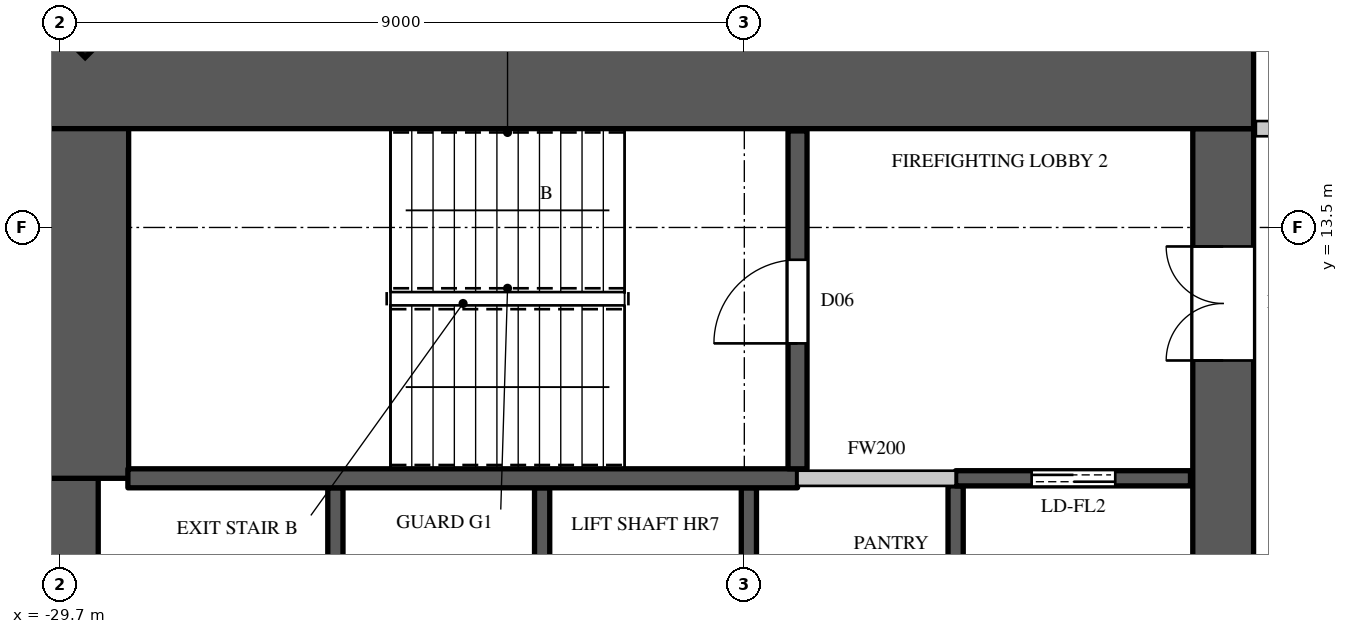
"""IFC4 building model, lengths in metres.
Left out: names, types, materials, properties, quantities, classifications, styles, units other than length and angle.
Written with IfcOpenShell. Run it as: python <this file> out.ifc"""

import sys

from ifc_helpers import new_model, si_unit, direction, frame, frame_2d, origin, origin_2d, place, context, subcontext, project, spatial, rectangle, extrude, element, fill, save


model = new_model("IFC4")
c1 = context("Model", 3, precision=1e-05, world=origin(), true_north=direction((0.0, 1.0)))
c2 = subcontext(c1, "Body", "Model", "MODEL_VIEW")
j1 = project(units=[si_unit("LENGTHUNIT", "METRE"), si_unit("PLANEANGLEUNIT", "RADIAN")], contexts=[c1])
p1 = place(None, origin())
s1 = spatial("IfcSite", under=j1, at=p1, CompositionType="ELEMENT")
p2 = place(p1, origin())
s2 = spatial("IfcBuilding", under=s1, at=p2, CompositionType="ELEMENT")
p3 = place(p2, frame((0.0, 0.0, 201.5)))
s3 = spatial("IfcBuildingStorey", under=s2, at=p3, CompositionType="ELEMENT", Elevation=201.5)
p4 = place(p3, frame((-29.443, 16.443, 0.0), z_axis=(0.0, 0.0, 1.0), x_axis=(-0.707106781187, -0.707106781187, 0.0)))
e1 = element("IfcColumn", 1, at=p4, inside=s3, PredefinedType="COLUMN", context=c2, shape_type="SweptSolid", body=[
    extrude(rectangle(XDim=0.9, YDim=1.1, at=origin_2d()), origin(), (0.0, 0.0, 1.0), 4.1),
])
p5 = place(p3, frame((-30.0, 15.4, 0.0), z_axis=(0.0, 0.0, 1.0), x_axis=(1.0, 0.0, 0.0)))
e2 = element("IfcWall", 2, at=p5, inside=s3, PredefinedType="SHEAR", context=c2, shape_type="SweptSolid", body=[
    extrude(rectangle(XDim=16.0, YDim=1.2, at=frame_2d((8.0, 0.0))), origin(), (0.0, 0.0, 1.0), 4.1),
])
p6 = place(p3, frame((-14.4, -14.8, 0.0), z_axis=(0.0, 0.0, 1.0), x_axis=(0.0, 1.0, 0.0)))
e3 = element("IfcWall", 3, at=p6, inside=s3, PredefinedType="SHEAR", context=c2, shape_type="SweptSolid", body=[
    extrude(rectangle(XDim=29.6, YDim=0.8, at=frame_2d((14.8, 0.0))), origin(), (0.0, 0.0, 1.0), 4.1),
])
p7 = place(p6, frame((1.55, 0.0, 0.0)))
e4 = element("IfcOpeningElement", 4, at=p7, cuts=e3, PredefinedType="OPENING", context=c2, shape_type="SweptSolid", body=[
    extrude(rectangle(XDim=1.5, YDim=2.4, at=frame_2d((0.75, 1.2))), frame((0.0, 0.41, 0.0), z_axis=(0.0, -1.0, 0.0), x_axis=(1.0, 0.0, 0.0)), (0.0, 0.0, 1.0), 0.82),
])
p8 = place(p6, frame((26.55, 0.0, 0.0)))
e5 = element("IfcOpeningElement", 5, at=p8, cuts=e3, PredefinedType="OPENING", context=c2, shape_type="SweptSolid", body=[
    extrude(rectangle(XDim=1.5, YDim=2.4, at=frame_2d((0.75, 1.2))), frame((0.0, 0.41, 0.0), z_axis=(0.0, -1.0, 0.0), x_axis=(1.0, 0.0, 0.0)), (0.0, 0.0, 1.0), 0.82),
])
p9 = place(p6, frame((8.45, 0.0, 0.0)))
e6 = element("IfcOpeningElement", 6, at=p9, cuts=e3, PredefinedType="OPENING", context=c2, shape_type="SweptSolid", body=[
    extrude(rectangle(XDim=1.5, YDim=2.4, at=frame_2d((0.75, 1.2))), frame((0.0, 0.41, 0.0), z_axis=(0.0, -1.0, 0.0), x_axis=(1.0, 0.0, 0.0)), (0.0, 0.0, 1.0), 0.82),
])
p10 = place(p6, frame((19.65, 0.0, 0.0)))
e7 = element("IfcOpeningElement", 7, at=p10, cuts=e3, PredefinedType="OPENING", context=c2, shape_type="SweptSolid", body=[
    extrude(rectangle(XDim=1.5, YDim=2.4, at=frame_2d((0.75, 1.2))), frame((0.0, 0.41, 0.0), z_axis=(0.0, -1.0, 0.0), x_axis=(1.0, 0.0, 0.0)), (0.0, 0.0, 1.0), 0.82),
])
p11 = place(p6, frame((14.5, 0.0, 0.0)))
e8 = element("IfcOpeningElement", 8, at=p11, cuts=e3, PredefinedType="OPENING", context=c2, shape_type="SweptSolid", body=[
    extrude(rectangle(XDim=0.6, YDim=2.0, at=frame_2d((0.3, 1.0))), frame((0.0, 0.41, 0.0), z_axis=(0.0, -1.0, 0.0), x_axis=(1.0, 0.0, 0.0)), (0.0, 0.0, 1.0), 0.82),
])
p12 = place(p3, frame((-29.6, -10.2, 0.0), z_axis=(0.0, 0.0, 1.0), x_axis=(0.0, 1.0, 0.0)))
e9 = element("IfcWall", 9, at=p12, inside=s3, PredefinedType="SHEAR", context=c2, shape_type="SweptSolid", body=[
    extrude(rectangle(XDim=20.4, YDim=0.8, at=frame_2d((10.2, 0.0))), origin(), (0.0, 0.0, 1.0), 4.1),
])
p13 = place(p3, frame((-29.4, 10.2, 0.0), z_axis=(0.0, 0.0, 1.0), x_axis=(0.0, 1.0, 0.0)))
e10 = element("IfcWall", 10, at=p13, inside=s3, PredefinedType="SHEAR", context=c2, shape_type="SweptSolid", body=[
    extrude(rectangle(XDim=4.6, YDim=1.2, at=frame_2d((2.3, 0.0))), origin(), (0.0, 0.0, 1.0), 4.1),
])
p14 = place(p3, frame((-20.0, 10.2, 0.0), z_axis=(0.0, 0.0, 1.0), x_axis=(1.0, 0.0, 0.0)))
e11 = element("IfcWall", 11, at=p14, inside=s3, PredefinedType="PARTITIONING", context=c2, shape_type="SweptSolid", body=[
    extrude(rectangle(XDim=2.08, YDim=0.2, at=frame_2d((1.04, 0.0))), origin(), (0.0, 0.0, 1.0), 3.8),
])
p15 = place(p3, frame((-13.97, 14.8, 0.0), z_axis=(0.0, 0.0, 1.0), x_axis=(1.0, 0.0, 0.0)))
e12 = element("IfcWall", 12, at=p15, inside=s3, PredefinedType="PARTITIONING", context=c2, shape_type="SweptSolid", body=[
    extrude(rectangle(XDim=2.87, YDim=0.2, at=frame_2d((1.435, 0.0))), origin(), (0.0, 0.0, 1.0), 3.8),
])
for number, where, z_axis, x_axis in (
    (13, (-26.08, 7.5, 0.0), (0.0, 0.0, 1.0), (0.0, 1.0, 0.0)),
    (14, (-23.36, 7.5, 0.0), (0.0, 0.0, 1.0), (0.0, 1.0, 0.0)),
):
    element("IfcWall", number, at=place(p3, frame(where, z_axis=z_axis, x_axis=x_axis)), inside=s3, PredefinedType="SHEAR", context=c2, shape_type="SweptSolid", body=[
        extrude(rectangle(XDim=2.575, YDim=0.2, at=frame_2d((1.288, 0.0))), origin(), (0.0, 0.0, 1.0), 4.1),
    ])
p16 = place(p3, frame((-20.64, 7.5, 0.0), z_axis=(0.0, 0.0, 1.0), x_axis=(0.0, 1.0, 0.0)))
e15 = element("IfcWall", 15, at=p16, inside=s3, PredefinedType="SHEAR", context=c2, shape_type="SweptSolid", body=[
    extrude(rectangle(XDim=2.575, YDim=0.2, at=frame_2d((1.288, 0.0))), origin(), (0.0, 0.0, 1.0), 3.8),
])
p17 = place(p3, frame((-17.92, 7.5, 0.0), z_axis=(0.0, 0.0, 1.0), x_axis=(0.0, 1.0, 0.0)))
e16 = element("IfcWall", 16, at=p17, inside=s3, PredefinedType="SHEAR", context=c2, shape_type="SweptSolid", body=[
    extrude(rectangle(XDim=2.6, YDim=0.2, at=frame_2d((1.3, 0.0))), origin(), (0.0, 0.0, 1.0), 3.8),
])
p18 = place(p3, frame((-17.92, 10.2, 0.0), z_axis=(0.0, 0.0, 1.0), x_axis=(1.0, 0.0, 0.0)))
e17 = element("IfcWall", 17, at=p18, inside=s3, PredefinedType="SHEAR", context=c2, shape_type="SweptSolid", body=[
    extrude(rectangle(XDim=3.09, YDim=0.2, at=frame_2d((1.545, 0.0))), origin(), (0.0, 0.0, 1.0), 3.8),
])
p19 = place(p18, frame((1.0, 0.0, 0.0)))
e18 = element("IfcOpeningElement", 18, at=p19, cuts=e17, PredefinedType="OPENING", context=c2, shape_type="SweptSolid", body=[
    extrude(rectangle(XDim=1.1, YDim=2.2, at=frame_2d((0.55, 1.1))), frame((0.0, 0.11, 0.0), z_axis=(0.0, -1.0, 0.0), x_axis=(1.0, 0.0, 0.0)), (0.0, 0.0, 1.0), 0.22),
])
p20 = place(p3, frame((-28.81, 10.2, 0.0), z_axis=(0.0, 0.0, 1.0), x_axis=(1.0, 0.0, 0.0)))
e19 = element("IfcWall", 19, at=p20, inside=s3, PredefinedType="SHEAR", context=c2, shape_type="SweptSolid", body=[
    extrude(rectangle(XDim=8.81, YDim=0.25, at=frame_2d((4.405, 0.0))), origin(), (0.0, 0.0, 1.0), 3.8),
])
p21 = place(p3, frame((-20.0, 10.325, 0.0), z_axis=(0.0, 0.0, 1.0), x_axis=(0.0, 1.0, 0.0)))
e20 = element("IfcWall", 20, at=p21, inside=s3, PredefinedType="SHEAR", context=c2, shape_type="SweptSolid", body=[
    extrude(rectangle(XDim=4.445, YDim=0.25, at=frame_2d((2.223, 0.0))), origin(), (0.0, 0.0, 1.0), 3.8),
])
p22 = place(p21, frame((1.65, 0.0, 0.0)))
e21 = element("IfcOpeningElement", 21, at=p22, cuts=e20, PredefinedType="OPENING", context=c2, shape_type="SweptSolid", body=[
    extrude(rectangle(XDim=1.1, YDim=2.2, at=frame_2d((0.55, 1.1))), frame((0.0, 0.135, 0.0), z_axis=(0.0, -1.0, 0.0), x_axis=(1.0, 0.0, 0.0)), (0.0, 0.0, 1.0), 0.27),
])
p23 = place(p22, origin())
e22 = element("IfcDoor", 22, at=p23, inside=s3, OperationType="SINGLE_SWING_LEFT", PredefinedType="DOOR", context=c2, shape_type="SweptSolid", body=[
    extrude(rectangle(XDim=1.1, YDim=2.2, at=frame_2d((0.55, 1.1))), frame((0.0, 0.025, 0.0), z_axis=(0.0, -1.0, 0.0), x_axis=(1.0, 0.0, 0.0)), (0.0, 0.0, 1.0), 0.05),
])
fill(e21, e22)
p24 = place(p19, origin())
e23 = element("IfcDoor", 23, at=p24, inside=s3, OperationType="DOUBLE_DOOR_SLIDING", PredefinedType="DOOR", context=c2, shape_type="SweptSolid", body=[
    extrude(rectangle(XDim=1.1, YDim=2.2, at=frame_2d((0.55, 1.1))), frame((0.0, 0.025, 0.0), z_axis=(0.0, -1.0, 0.0), x_axis=(1.0, 0.0, 0.0)), (0.0, 0.0, 1.0), 0.05),
])
fill(e18, e23)
p25 = place(p8, origin())
e24 = element("IfcDoor", 24, at=p25, inside=s3, OperationType="DOUBLE_DOOR_SINGLE_SWING", PredefinedType="DOOR", context=c2, shape_type="SweptSolid", body=[
    extrude(rectangle(XDim=1.5, YDim=2.4, at=frame_2d((0.75, 1.2))), frame((0.0, 0.395, 0.0), z_axis=(0.0, -1.0, 0.0), x_axis=(1.0, 0.0, 0.0)), (0.0, 0.0, 1.0), 0.05),
])
fill(e5, e24)
save(model, sys.argv[1])
